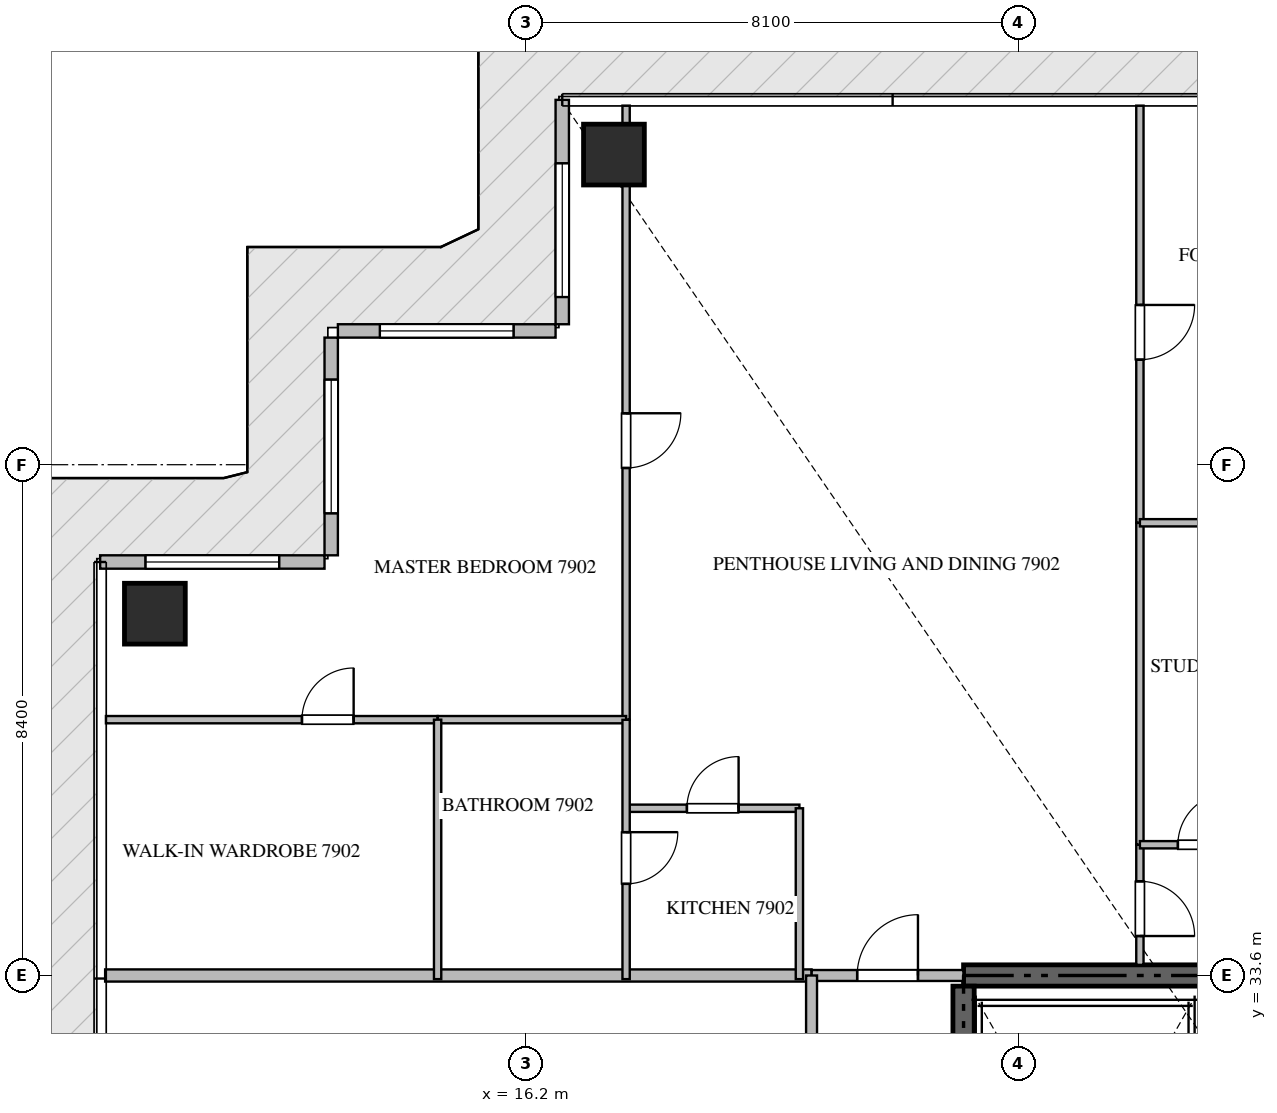
"""IFC4 building model, lengths in metres.
Left out: names, types, materials, properties, quantities, classifications, styles, units other than length and angle.
Written with IfcOpenShell. Run it as: python <this file> out.ifc"""

import sys

from ifc_helpers import new_model, si_unit, direction, frame, frame_2d, origin, origin_2d, place, context, subcontext, project, spatial, rectangle, extrude, source, transform, mapped, element, fill, save


model = new_model("IFC4")
c1 = context("Model", 3, precision=1e-05, world=origin(), true_north=direction((0.0, 1.0)))
c2 = subcontext(c1, "Body", "Model", "MODEL_VIEW")
j1 = project(units=[si_unit("LENGTHUNIT", "METRE"), si_unit("PLANEANGLEUNIT", "RADIAN")], contexts=[c1])
p1 = place(None, origin())
s1 = spatial("IfcSite", under=j1, at=p1, CompositionType="ELEMENT")
p2 = place(p1, origin())
s2 = spatial("IfcBuilding", under=s1, at=p2, CompositionType="ELEMENT")
p3 = place(p2, frame((0.0, 0.0, 317.75)))
s3 = spatial("IfcBuildingStorey", under=s2, at=p3, CompositionType="ELEMENT", Elevation=317.75)
p4 = place(p3, frame((41.4, 33.6, -0.26), z_axis=(0.0, 0.0, 1.0), x_axis=(-1.0, 0.0, 0.0)))
e1 = element("IfcWall", 1, at=p4, inside=s3, PredefinedType="SHEAR", context=c2, shape_type="SweptSolid", body=[
    extrude(rectangle(XDim=18.0, YDim=0.35, at=frame_2d((9.0, 0.0))), origin(), (0.0, 0.0, 1.0), 4.048),
])
p5 = place(p3, frame((23.4, 24.25, -0.26), z_axis=(0.0, 0.0, 1.0), x_axis=(0.0, 1.0, 0.0)))
e2 = element("IfcWall", 2, at=p5, inside=s3, PredefinedType="SHEAR", context=c2, shape_type="SweptSolid", body=[
    extrude(rectangle(XDim=9.175, YDim=0.35, at=frame_2d((4.587, 0.0))), origin(), (0.0, 0.0, 1.0), 4.048),
])
m1 = source(origin(), c2, "Body", "SweptSolid", [
    extrude(rectangle(XDim=1.0, YDim=1.0, at=origin_2d()), origin(), (0.0, 0.0, 1.0), 4.05),
])
for number, where, z_axis, x_axis in (
    (3, (17.65, 47.1, -0.26), (0.0, 0.0, 1.0), (1.0, 0.0, 0.0)),
    (4, (10.1, 39.55, -0.26), (0.0, 0.0, 1.0), (1.0, 0.0, 0.0)),
):
    element("IfcColumn", number, at=place(p3, frame(where, z_axis=z_axis, x_axis=x_axis)), inside=s3, PredefinedType="COLUMN", context=c2, shape_type="MappedRepresentation", body=[
        mapped(m1, transform((0.0, 0.0, 0.0), scale=1.0)),
    ])
p6 = place(p3, frame((16.8, 48.0, 0.0), z_axis=(0.0, 0.0, 1.0), x_axis=(0.0, -1.0, 0.0)))
e5 = element("IfcWall", 5, at=p6, inside=s3, PredefinedType="ELEMENTEDWALL", context=c2, shape_type="SweptSolid", body=[
    extrude(rectangle(XDim=3.69, YDim=0.22, at=frame_2d((1.845, 0.0))), origin(), (0.0, 0.0, 1.0), 3.775),
])
p7 = place(p6, frame((1.043, 0.0, 0.65)))
e6 = element("IfcOpeningElement", 6, at=p7, cuts=e5, PredefinedType="OPENING", context=c2, shape_type="SweptSolid", body=[
    extrude(rectangle(XDim=2.2, YDim=2.4, at=frame_2d((1.1, 1.2))), frame((0.0, 0.12, 0.0), z_axis=(0.0, -1.0, 0.0), x_axis=(1.0, 0.0, 0.0)), (0.0, 0.0, 1.0), 0.24),
])
p8 = place(p3, frame((16.69, 44.2, 0.0), z_axis=(0.0, 0.0, 1.0), x_axis=(-1.0, 0.0, 0.0)))
e7 = element("IfcWall", 7, at=p8, inside=s3, PredefinedType="ELEMENTEDWALL", context=c2, shape_type="SweptSolid", body=[
    extrude(rectangle(XDim=3.58, YDim=0.22, at=frame_2d((1.79, 0.0))), origin(), (0.0, 0.0, 1.0), 3.775),
])
p9 = place(p8, frame((0.69, 0.0, 0.65)))
e8 = element("IfcOpeningElement", 8, at=p9, cuts=e7, PredefinedType="OPENING", context=c2, shape_type="SweptSolid", body=[
    extrude(rectangle(XDim=2.2, YDim=2.4, at=frame_2d((1.1, 1.2))), frame((0.0, 0.12, 0.0), z_axis=(0.0, -1.0, 0.0), x_axis=(1.0, 0.0, 0.0)), (0.0, 0.0, 1.0), 0.24),
])
p10 = place(p3, frame((13.0, 44.09, 0.0), z_axis=(0.0, 0.0, 1.0), x_axis=(0.0, -1.0, 0.0)))
e9 = element("IfcWall", 9, at=p10, inside=s3, PredefinedType="ELEMENTEDWALL", context=c2, shape_type="SweptSolid", body=[
    extrude(rectangle(XDim=3.58, YDim=0.22, at=frame_2d((1.79, 0.0))), origin(), (0.0, 0.0, 1.0), 3.775),
])
p11 = place(p10, frame((0.69, 0.0, 0.65)))
e10 = element("IfcOpeningElement", 10, at=p11, cuts=e9, PredefinedType="OPENING", context=c2, shape_type="SweptSolid", body=[
    extrude(rectangle(XDim=2.2, YDim=2.4, at=frame_2d((1.1, 1.2))), frame((0.0, 0.12, 0.0), z_axis=(0.0, -1.0, 0.0), x_axis=(1.0, 0.0, 0.0)), (0.0, 0.0, 1.0), 0.24),
])
p12 = place(p3, frame((12.89, 40.4, 0.0), z_axis=(0.0, 0.0, 1.0), x_axis=(-1.0, 0.0, 0.0)))
e11 = element("IfcWall", 11, at=p12, inside=s3, PredefinedType="ELEMENTEDWALL", context=c2, shape_type="SweptSolid", body=[
    extrude(rectangle(XDim=3.69, YDim=0.22, at=frame_2d((1.845, 0.0))), origin(), (0.0, 0.0, 1.0), 3.775),
])
p13 = place(p12, frame((0.745, 0.0, 0.65)))
e12 = element("IfcOpeningElement", 12, at=p13, cuts=e11, PredefinedType="OPENING", context=c2, shape_type="SweptSolid", body=[
    extrude(rectangle(XDim=2.2, YDim=2.4, at=frame_2d((1.1, 1.2))), frame((0.0, 0.12, 0.0), z_axis=(0.0, -1.0, 0.0), x_axis=(1.0, 0.0, 0.0)), (0.0, 0.0, 1.0), 0.24),
])
p14 = place(p3, frame((9.282, 33.6, 0.0), z_axis=(0.0, 0.0, 1.0), x_axis=(1.0, 0.0, 0.0)))
e13 = element("IfcWall", 13, at=p14, inside=s3, PredefinedType="PARTITIONING", context=c2, shape_type="SweptSolid", body=[
    extrude(rectangle(XDim=11.618, YDim=0.2, at=frame_2d((5.809, 0.0))), origin(), (0.0, 0.0, 1.0), 3.79),
])
p15 = place(p3, frame((20.902, 33.6, 0.0), z_axis=(0.0, 0.0, 1.0), x_axis=(1.0, 0.0, 0.0)))
e14 = element("IfcWall", 14, at=p15, inside=s3, PredefinedType="PARTITIONING", context=c2, shape_type="SweptSolid", body=[
    extrude(rectangle(XDim=2.496, YDim=0.18, at=frame_2d((1.248, 0.0))), origin(), (0.0, 0.0, 1.0), 3.79),
])
p16 = place(p15, frame((0.748, 0.0, 0.0)))
e15 = element("IfcOpeningElement", 15, at=p16, cuts=e14, PredefinedType="OPENING", context=c2, shape_type="SweptSolid", body=[
    extrude(rectangle(XDim=1.0, YDim=2.15, at=frame_2d((0.5, 1.075))), frame((0.0, 0.1, 0.0), z_axis=(0.0, -1.0, 0.0), x_axis=(1.0, 0.0, 0.0)), (0.0, 0.0, 1.0), 0.2),
])
p17 = place(p3, frame((20.9, 16.8, 0.0), z_axis=(0.0, 0.0, 1.0), x_axis=(0.0, 1.0, 0.0)))
e16 = element("IfcWall", 16, at=p17, inside=s3, PredefinedType="PARTITIONING", context=c2, shape_type="SweptSolid", body=[
    extrude(rectangle(XDim=16.8, YDim=0.18, at=frame_2d((8.4, 0.0))), origin(), (0.0, 0.0, 1.0), 3.79),
])
p18 = place(p17, frame((14.5, 0.0, 0.0)))
e17 = element("IfcOpeningElement", 17, at=p18, cuts=e16, PredefinedType="OPENING", context=c2, shape_type="SweptSolid", body=[
    extrude(rectangle(XDim=1.0, YDim=2.15, at=frame_2d((0.5, 1.075))), frame((0.0, 0.1, 0.0), z_axis=(0.0, -1.0, 0.0), x_axis=(1.0, 0.0, 0.0)), (0.0, 0.0, 1.0), 0.2),
])
p19 = place(p3, frame((17.85, 36.35, 0.0), z_axis=(0.0, 0.0, 1.0), x_axis=(1.0, 0.0, 0.0)))
e18 = element("IfcWall", 18, at=p19, inside=s3, PredefinedType="PARTITIONING", context=c2, shape_type="SweptSolid", body=[
    extrude(rectangle(XDim=2.85, YDim=0.12, at=frame_2d((1.425, 0.0))), origin(), (0.0, 0.0, 1.0), 3.79),
])
p20 = place(p19, frame((1.0, 0.0, 0.0)))
e19 = element("IfcOpeningElement", 19, at=p20, cuts=e18, PredefinedType="OPENING", context=c2, shape_type="SweptSolid", body=[
    extrude(rectangle(XDim=0.85, YDim=2.1, at=frame_2d((0.425, 1.05))), frame((0.0, 0.07, 0.0), z_axis=(0.0, -1.0, 0.0), x_axis=(1.0, 0.0, 0.0)), (0.0, 0.0, 1.0), 0.14),
])
p21 = place(p3, frame((20.7, 36.35, 0.0), z_axis=(0.0, 0.0, 1.0), x_axis=(0.0, -1.0, 0.0)))
e20 = element("IfcWall", 20, at=p21, inside=s3, PredefinedType="PARTITIONING", context=c2, shape_type="SweptSolid", body=[
    extrude(rectangle(XDim=2.81, YDim=0.12, at=frame_2d((1.405, 0.0))), origin(), (0.0, 0.0, 1.0), 3.79),
])
p22 = place(p3, frame((17.85, 47.905, 0.0), z_axis=(0.0, 0.0, 1.0), x_axis=(0.0, -1.0, 0.0)))
e21 = element("IfcWall", 21, at=p22, inside=s3, PredefinedType="PARTITIONING", context=c2, shape_type="SweptSolid", body=[
    extrude(rectangle(XDim=10.098, YDim=0.12, at=frame_2d((5.049, 0.0))), origin(), (0.0, 0.0, 1.0), 3.292),
])
p23 = place(p22, frame((5.059, 0.0, 0.0)))
e22 = element("IfcOpeningElement", 22, at=p23, cuts=e21, PredefinedType="OPENING", context=c2, shape_type="SweptSolid", body=[
    extrude(rectangle(XDim=0.9, YDim=2.1, at=frame_2d((0.45, 1.05))), frame((0.0, 0.07, 0.0), z_axis=(0.0, -1.0, 0.0), x_axis=(1.0, 0.0, 0.0)), (0.0, 0.0, 1.0), 0.14),
])
p24 = place(p3, frame((9.295, 37.807, 0.0), z_axis=(0.0, 0.0, 1.0), x_axis=(1.0, 0.0, 0.0)))
e23 = element("IfcWall", 23, at=p24, inside=s3, PredefinedType="PARTITIONING", context=c2, shape_type="SweptSolid", body=[
    extrude(rectangle(XDim=5.455, YDim=0.12, at=frame_2d((2.728, 0.0))), origin(), (0.0, 0.0, 1.0), 3.79),
])
p25 = place(p24, frame((3.224, 0.0, 0.0)))
e24 = element("IfcOpeningElement", 24, at=p25, cuts=e23, PredefinedType="OPENING", context=c2, shape_type="SweptSolid", body=[
    extrude(rectangle(XDim=0.85, YDim=2.1, at=frame_2d((0.425, 1.05))), frame((0.0, 0.07, 0.0), z_axis=(0.0, -1.0, 0.0), x_axis=(1.0, 0.0, 0.0)), (0.0, 0.0, 1.0), 0.14),
])
p26 = place(p3, frame((14.752, 37.807, 0.0), z_axis=(0.0, 0.0, 1.0), x_axis=(1.0, 0.0, 0.0)))
e25 = element("IfcWall", 25, at=p26, inside=s3, PredefinedType="PARTITIONING", context=c2, shape_type="SweptSolid", body=[
    extrude(rectangle(XDim=3.098, YDim=0.12, at=frame_2d((1.549, 0.0))), origin(), (0.0, 0.0, 1.0), 3.79),
])
p27 = place(p3, frame((14.75, 37.807, 0.0), z_axis=(0.0, 0.0, 1.0), x_axis=(0.0, -1.0, 0.0)))
e26 = element("IfcWall", 26, at=p27, inside=s3, PredefinedType="PARTITIONING", context=c2, shape_type="SweptSolid", body=[
    extrude(rectangle(XDim=4.267, YDim=0.12, at=frame_2d((2.133, 0.0))), origin(), (0.0, 0.0, 1.0), 3.79),
])
p28 = place(p3, frame((17.85, 37.805, 0.0), z_axis=(0.0, 0.0, 1.0), x_axis=(0.0, -1.0, 0.0)))
e27 = element("IfcWall", 27, at=p28, inside=s3, PredefinedType="PARTITIONING", context=c2, shape_type="SweptSolid", body=[
    extrude(rectangle(XDim=4.265, YDim=0.12, at=frame_2d((2.132, 0.0))), origin(), (0.0, 0.0, 1.0), 3.372),
])
p29 = place(p28, frame((1.848, 0.0, 0.0)))
e28 = element("IfcOpeningElement", 28, at=p29, cuts=e27, PredefinedType="OPENING", context=c2, shape_type="SweptSolid", body=[
    extrude(rectangle(XDim=0.85, YDim=2.1, at=frame_2d((0.425, 1.05))), frame((0.0, 0.07, 0.0), z_axis=(0.0, -1.0, 0.0), x_axis=(1.0, 0.0, 0.0)), (0.0, 0.0, 1.0), 0.14),
])
p30 = place(p3, frame((26.3, 35.75, 0.0), z_axis=(0.0, 0.0, 1.0), x_axis=(0.0, -1.0, 0.0)))
e29 = element("IfcWall", 29, at=p30, inside=s3, PredefinedType="PARTITIONING", context=c2, shape_type="SweptSolid", body=[
    extrude(rectangle(XDim=1.975, YDim=0.12, at=frame_2d((0.988, 0.0))), origin(), (0.0, 0.0, 1.0), 3.79),
])
p31 = place(p30, frame((0.601, 0.0, 0.0)))
e30 = element("IfcOpeningElement", 30, at=p31, cuts=e29, PredefinedType="OPENING", context=c2, shape_type="SweptSolid", body=[
    extrude(rectangle(XDim=0.9, YDim=2.1, at=frame_2d((0.45, 1.05))), frame((0.0, 0.07, 0.0), z_axis=(0.0, -1.0, 0.0), x_axis=(1.0, 0.0, 0.0)), (0.0, 0.0, 1.0), 0.14),
])
p32 = place(p3, frame((26.3, 47.905, 0.0), z_axis=(0.0, 0.0, 1.0), x_axis=(0.0, -1.0, 0.0)))
e31 = element("IfcWall", 31, at=p32, inside=s3, PredefinedType="PARTITIONING", context=c2, shape_type="SweptSolid", body=[
    extrude(rectangle(XDim=6.86, YDim=0.12, at=frame_2d((3.43, 0.0))), origin(), (0.0, 0.0, 1.0), 3.79),
])
p33 = place(p32, frame((3.278, 0.0, 0.0)))
e32 = element("IfcOpeningElement", 32, at=p33, cuts=e31, PredefinedType="OPENING", context=c2, shape_type="SweptSolid", body=[
    extrude(rectangle(XDim=0.9, YDim=2.1, at=frame_2d((0.45, 1.05))), frame((0.0, 0.07, 0.0), z_axis=(0.0, -1.0, 0.0), x_axis=(1.0, 0.0, 0.0)), (0.0, 0.0, 1.0), 0.14),
])
p34 = place(p3, frame((26.3, 41.043, 0.0), z_axis=(0.0, 0.0, 1.0), x_axis=(0.0, -1.0, 0.0)))
e33 = element("IfcWall", 33, at=p34, inside=s3, PredefinedType="PARTITIONING", context=c2, shape_type="SweptSolid", body=[
    extrude(rectangle(XDim=5.291, YDim=0.12, at=frame_2d((2.646, 0.0))), origin(), (0.0, 0.0, 1.0), 3.79),
])
p35 = place(p3, frame((26.3, 41.045, 0.0), z_axis=(0.0, 0.0, 1.0), x_axis=(1.0, 0.0, 0.0)))
e34 = element("IfcWall", 34, at=p35, inside=s3, PredefinedType="PARTITIONING", context=c2, shape_type="SweptSolid", body=[
    extrude(rectangle(XDim=5.15, YDim=0.12, at=frame_2d((2.575, 0.0))), origin(), (0.0, 0.0, 1.0), 3.79),
])
p36 = place(p3, frame((26.3, 35.75, 0.0), z_axis=(0.0, 0.0, 1.0), x_axis=(1.0, 0.0, 0.0)))
e35 = element("IfcWall", 35, at=p36, inside=s3, PredefinedType="PARTITIONING", context=c2, shape_type="SweptSolid", body=[
    extrude(rectangle(XDim=2.1, YDim=0.12, at=frame_2d((1.05, 0.0))), origin(), (0.0, 0.0, 1.0), 3.79),
])
p37 = place(p36, frame((0.625, 0.0, 0.0)))
e36 = element("IfcOpeningElement", 36, at=p37, cuts=e35, PredefinedType="OPENING", context=c2, shape_type="SweptSolid", body=[
    extrude(rectangle(XDim=0.85, YDim=2.1, at=frame_2d((0.425, 1.05))), frame((0.0, 0.07, 0.0), z_axis=(0.0, -1.0, 0.0), x_axis=(1.0, 0.0, 0.0)), (0.0, 0.0, 1.0), 0.14),
])
m2 = source(origin(), c2, "Body", "SweptSolid", [
    extrude(rectangle(XDim=2.2, YDim=2.4, at=frame_2d((1.1, 1.2))), frame((0.0, 0.03, 0.0), z_axis=(0.0, -1.0, 0.0), x_axis=(1.0, 0.0, 0.0)), (0.0, 0.0, 1.0), 0.06),
])
p38 = place(p7, origin())
e37 = element("IfcWindow", 37, at=p38, inside=s3, PartitioningType="SINGLE_PANEL", PredefinedType="WINDOW", context=c2, shape_type="MappedRepresentation", body=[
    mapped(m2, transform((0.0, 0.0, 0.0), scale=1.0)),
])
fill(e6, e37)
p39 = place(p9, origin())
e38 = element("IfcWindow", 38, at=p39, inside=s3, PartitioningType="SINGLE_PANEL", PredefinedType="WINDOW", context=c2, shape_type="MappedRepresentation", body=[
    mapped(m2, transform((0.0, 0.0, 0.0), scale=1.0)),
])
fill(e8, e38)
p40 = place(p11, origin())
e39 = element("IfcWindow", 39, at=p40, inside=s3, PartitioningType="SINGLE_PANEL", PredefinedType="WINDOW", context=c2, shape_type="MappedRepresentation", body=[
    mapped(m2, transform((0.0, 0.0, 0.0), scale=1.0)),
])
fill(e10, e39)
p41 = place(p13, origin())
e40 = element("IfcWindow", 40, at=p41, inside=s3, PartitioningType="SINGLE_PANEL", PredefinedType="WINDOW", context=c2, shape_type="MappedRepresentation", body=[
    mapped(m2, transform((0.0, 0.0, 0.0), scale=1.0)),
])
fill(e12, e40)
m3 = source(origin(), c2, "Body", "SweptSolid", [
    extrude(rectangle(XDim=1.0, YDim=2.15, at=frame_2d((0.5, 1.075))), frame((0.0, 0.025, 0.0), z_axis=(0.0, -1.0, 0.0), x_axis=(1.0, 0.0, 0.0)), (0.0, 0.0, 1.0), 0.05),
])
p42 = place(p16, origin())
e41 = element("IfcDoor", 41, at=p42, inside=s3, OperationType="SINGLE_SWING_RIGHT", PredefinedType="DOOR", context=c2, shape_type="MappedRepresentation", body=[
    mapped(m3, transform((0.0, 0.0, 0.0), scale=1.0)),
])
fill(e15, e41)
m4 = source(origin(), c2, "Body", "SweptSolid", [
    extrude(rectangle(XDim=0.85, YDim=2.1, at=frame_2d((0.425, 1.05))), frame((0.0, 0.025, 0.0), z_axis=(0.0, -1.0, 0.0), x_axis=(1.0, 0.0, 0.0)), (0.0, 0.0, 1.0), 0.05),
])
p43 = place(p20, origin())
e42 = element("IfcDoor", 42, at=p43, inside=s3, OperationType="SINGLE_SWING_RIGHT", PredefinedType="DOOR", context=c2, shape_type="MappedRepresentation", body=[
    mapped(m4, transform((0.0, 0.0, 0.0), scale=1.0)),
])
fill(e19, e42)
m5 = source(origin(), c2, "Body", "SweptSolid", [
    extrude(rectangle(XDim=0.9, YDim=2.1, at=frame_2d((0.45, 1.05))), frame((0.0, 0.025, 0.0), z_axis=(0.0, -1.0, 0.0), x_axis=(1.0, 0.0, 0.0)), (0.0, 0.0, 1.0), 0.05),
])
p44 = place(p23, origin())
e43 = element("IfcDoor", 43, at=p44, inside=s3, OperationType="SINGLE_SWING_LEFT", PredefinedType="DOOR", context=c2, shape_type="MappedRepresentation", body=[
    mapped(m5, transform((0.0, 0.0, 0.0), scale=1.0)),
])
fill(e22, e43)
p45 = place(p25, origin())
e44 = element("IfcDoor", 44, at=p45, inside=s3, OperationType="SINGLE_SWING_RIGHT", PredefinedType="DOOR", context=c2, shape_type="MappedRepresentation", body=[
    mapped(m4, transform((0.0, 0.0, 0.0), scale=1.0)),
])
fill(e24, e44)
p46 = place(p29, origin())
e45 = element("IfcDoor", 45, at=p46, inside=s3, OperationType="SINGLE_SWING_LEFT", PredefinedType="DOOR", context=c2, shape_type="MappedRepresentation", body=[
    mapped(m4, transform((0.0, 0.0, 0.0), scale=1.0)),
])
fill(e28, e45)
p47 = place(p31, origin())
e46 = element("IfcDoor", 46, at=p47, inside=s3, OperationType="SINGLE_SWING_RIGHT", PredefinedType="DOOR", context=c2, shape_type="MappedRepresentation", body=[
    mapped(m5, transform((0.0, 0.0, 0.0), scale=1.0)),
])
fill(e30, e46)
p48 = place(p33, origin())
e47 = element("IfcDoor", 47, at=p48, inside=s3, OperationType="SINGLE_SWING_LEFT", PredefinedType="DOOR", context=c2, shape_type="MappedRepresentation", body=[
    mapped(m5, transform((0.0, 0.0, 0.0), scale=1.0)),
])
fill(e32, e47)
p49 = place(p37, origin())
e48 = element("IfcDoor", 48, at=p49, inside=s3, OperationType="SINGLE_SWING_RIGHT", PredefinedType="DOOR", context=c2, shape_type="MappedRepresentation", body=[
    mapped(m4, transform((0.0, 0.0, 0.0), scale=1.0)),
])
fill(e36, e48)
save(model, sys.argv[1])
